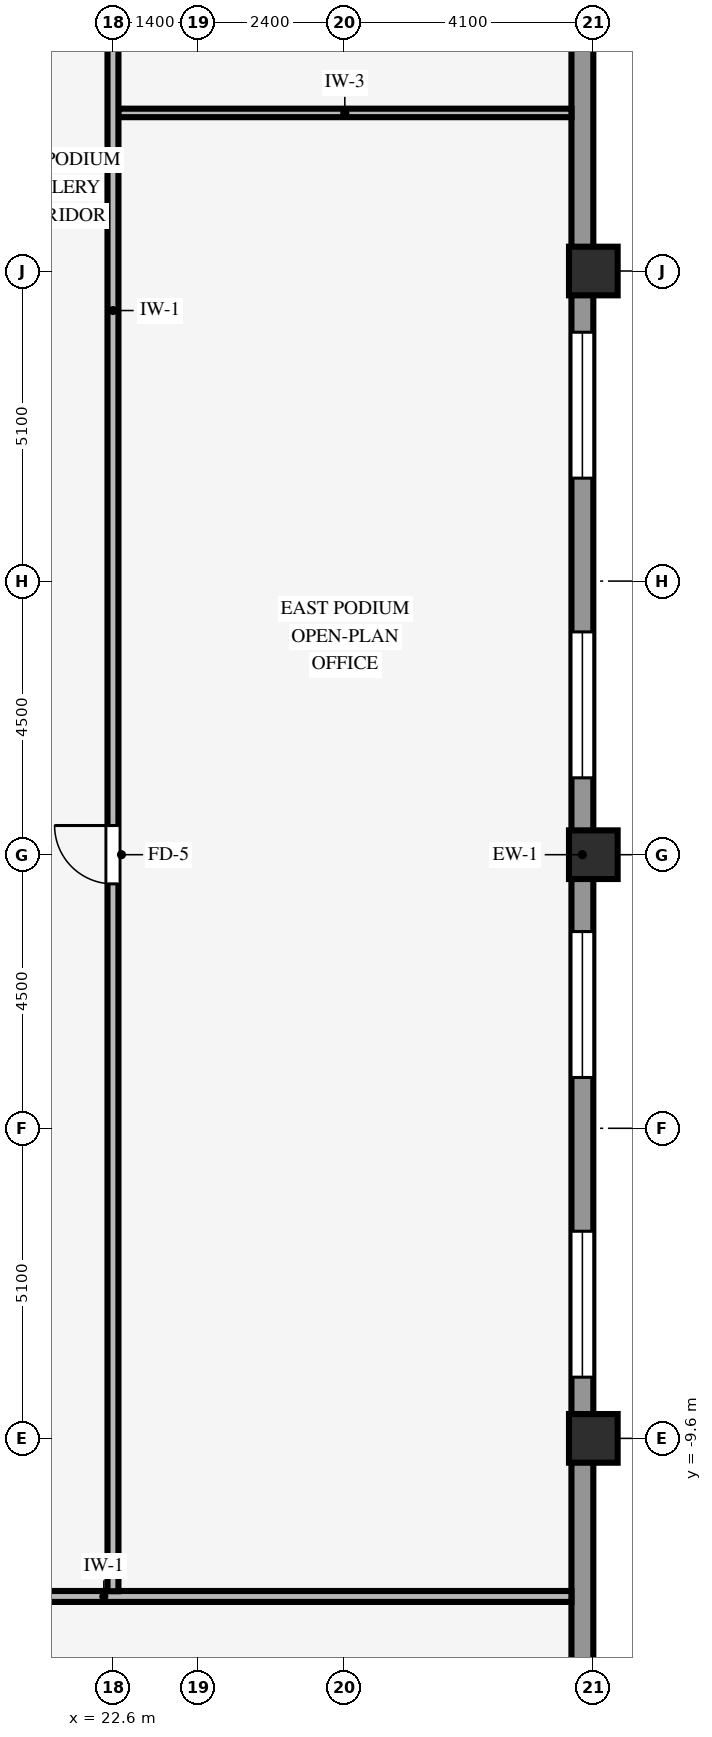
"""IFC4 building model, lengths in metres.
Left out: names, types, materials, properties, quantities, classifications, styles, units other than length and angle.
Written with IfcOpenShell. Run it as: python <this file> out.ifc"""

import sys

from ifc_helpers import new_model, si_unit, direction, frame, frame_2d, origin, origin_2d, place, context, subcontext, project, spatial, rectangle, hollow_rectangle, extrude, source, transform, mapped, element, fill, save


model = new_model("IFC4")
c1 = context("Model", 3, precision=1e-05, world=origin(), true_north=direction((0.0, 1.0)))
c2 = subcontext(c1, "Body", "Model", "MODEL_VIEW")
j1 = project(units=[si_unit("LENGTHUNIT", "METRE"), si_unit("PLANEANGLEUNIT", "RADIAN")], contexts=[c1])
p1 = place(None, origin())
s1 = spatial("IfcSite", under=j1, at=p1, CompositionType="ELEMENT")
p2 = place(p1, origin())
s2 = spatial("IfcBuilding", under=s1, at=p2, CompositionType="ELEMENT")
p3 = place(p2, frame((0.0, 0.0, 13.8)))
s3 = spatial("IfcBuildingStorey", under=s2, at=p3, CompositionType="ELEMENT", Elevation=13.8)
for number, where, z_axis, x_axis in (
    (1, (30.5, -9.6, 0.0), (0.0, 0.0, 1.0), (1.0, 0.0, 0.0)),
    (2, (30.5, 0.0, 0.0), (0.0, 0.0, 1.0), (1.0, 0.0, 0.0)),
    (3, (30.5, 9.6, 0.0), (0.0, 0.0, 1.0), (1.0, 0.0, 0.0)),
):
    element("IfcColumn", number, at=place(p3, frame(where, z_axis=z_axis, x_axis=x_axis)), inside=s3, PredefinedType="COLUMN", context=c2, shape_type="SweptSolid", body=[
        extrude(hollow_rectangle(XDim=0.8, YDim=0.8, WallThickness=0.055, InnerFilletRadius=0.055, OuterFilletRadius=0.11, at=origin_2d()), origin(), (0.0, 0.0, 1.0), 4.2),
    ])
p4 = place(p3, frame((30.32, -25.644, 0.0), z_axis=(0.0, 0.0, 1.0), x_axis=(0.0, 1.0, 0.0)))
e4 = element("IfcWall", 4, at=p4, inside=s3, PredefinedType="STANDARD", context=c2, shape_type="SweptSolid", body=[
    extrude(rectangle(XDim=51.288, YDim=0.36, at=frame_2d((25.644, 0.0))), origin(), (0.0, 0.0, 1.0), 3.535),
])
p5 = place(p4, frame((2.264, 0.0, 0.85)))
e5 = element("IfcOpeningElement", 5, at=p5, cuts=e4, PredefinedType="OPENING", context=c2, shape_type="SweptSolid", body=[
    extrude(rectangle(XDim=2.4, YDim=2.45, at=frame_2d((1.2, 1.225))), frame((0.0, 0.19, 0.0), z_axis=(0.0, -1.0, 0.0), x_axis=(1.0, 0.0, 0.0)), (0.0, 0.0, 1.0), 0.38),
])
p6 = place(p4, frame((17.051, 0.0, 0.85)))
e6 = element("IfcOpeningElement", 6, at=p6, cuts=e4, PredefinedType="OPENING", context=c2, shape_type="SweptSolid", body=[
    extrude(rectangle(XDim=2.4, YDim=2.45, at=frame_2d((1.2, 1.225))), frame((0.0, 0.19, 0.0), z_axis=(0.0, -1.0, 0.0), x_axis=(1.0, 0.0, 0.0)), (0.0, 0.0, 1.0), 0.38),
])
p7 = place(p4, frame((21.979, 0.0, 0.85)))
e7 = element("IfcOpeningElement", 7, at=p7, cuts=e4, PredefinedType="OPENING", context=c2, shape_type="SweptSolid", body=[
    extrude(rectangle(XDim=2.4, YDim=2.45, at=frame_2d((1.2, 1.225))), frame((0.0, 0.19, 0.0), z_axis=(0.0, -1.0, 0.0), x_axis=(1.0, 0.0, 0.0)), (0.0, 0.0, 1.0), 0.38),
])
p8 = place(p4, frame((26.908, 0.0, 0.85)))
e8 = element("IfcOpeningElement", 8, at=p8, cuts=e4, PredefinedType="OPENING", context=c2, shape_type="SweptSolid", body=[
    extrude(rectangle(XDim=2.4, YDim=2.45, at=frame_2d((1.2, 1.225))), frame((0.0, 0.19, 0.0), z_axis=(0.0, -1.0, 0.0), x_axis=(1.0, 0.0, 0.0)), (0.0, 0.0, 1.0), 0.38),
])
p9 = place(p4, frame((31.837, 0.0, 0.85)))
e9 = element("IfcOpeningElement", 9, at=p9, cuts=e4, PredefinedType="OPENING", context=c2, shape_type="SweptSolid", body=[
    extrude(rectangle(XDim=2.4, YDim=2.45, at=frame_2d((1.2, 1.225))), frame((0.0, 0.19, 0.0), z_axis=(0.0, -1.0, 0.0), x_axis=(1.0, 0.0, 0.0)), (0.0, 0.0, 1.0), 0.38),
])
p10 = place(p4, frame((46.624, 0.0, 0.85)))
e10 = element("IfcOpeningElement", 10, at=p10, cuts=e4, PredefinedType="OPENING", context=c2, shape_type="SweptSolid", body=[
    extrude(rectangle(XDim=2.4, YDim=2.45, at=frame_2d((1.2, 1.225))), frame((0.0, 0.19, 0.0), z_axis=(0.0, -1.0, 0.0), x_axis=(1.0, 0.0, 0.0)), (0.0, 0.0, 1.0), 0.38),
])
p11 = place(p3, frame((7.86, -12.2, 0.0), z_axis=(0.0, 0.0, 1.0), x_axis=(1.0, 0.0, 0.0)))
e11 = element("IfcWall", 11, at=p11, inside=s3, PredefinedType="PARTITIONING", context=c2, shape_type="SweptSolid", body=[
    extrude(rectangle(XDim=22.28, YDim=0.18, at=frame_2d((11.14, 0.0))), origin(), (0.0, 0.0, 1.0), 4.19),
])
p12 = place(p11, frame((5.49, 0.0, 0.0)))
e12 = element("IfcOpeningElement", 12, at=p12, cuts=e11, PredefinedType="OPENING", context=c2, shape_type="SweptSolid", body=[
    extrude(rectangle(XDim=0.96, YDim=2.1, at=frame_2d((0.48, 1.05))), frame((0.0, 0.1, 0.0), z_axis=(0.0, -1.0, 0.0), x_axis=(1.0, 0.0, 0.0)), (0.0, 0.0, 1.0), 0.2),
])
p13 = place(p3, frame((22.686, 12.2, 0.0), z_axis=(0.0, 0.0, 1.0), x_axis=(1.0, 0.0, 0.0)))
e13 = element("IfcWall", 13, at=p13, inside=s3, PredefinedType="PARTITIONING", context=c2, shape_type="SweptSolid", body=[
    extrude(rectangle(XDim=7.454, YDim=0.14, at=frame_2d((3.727, 0.0))), origin(), (0.0, 0.0, 1.0), 4.19),
])
p14 = place(p3, frame((22.6, -12.114, 0.0), z_axis=(0.0, 0.0, 1.0), x_axis=(0.0, 1.0, 0.0)))
e14 = element("IfcWall", 14, at=p14, inside=s3, PredefinedType="PARTITIONING", context=c2, shape_type="SweptSolid", body=[
    extrude(rectangle(XDim=37.919, YDim=0.18, at=frame_2d((18.959, 0.0))), origin(), (0.0, 0.0, 1.0), 4.19),
])
p15 = place(p14, frame((11.634, 0.0, 0.0)))
e15 = element("IfcOpeningElement", 15, at=p15, cuts=e14, PredefinedType="OPENING", context=c2, shape_type="SweptSolid", body=[
    extrude(rectangle(XDim=0.96, YDim=2.1, at=frame_2d((0.48, 1.05))), frame((0.0, 0.1, 0.0), z_axis=(0.0, -1.0, 0.0), x_axis=(1.0, 0.0, 0.0)), (0.0, 0.0, 1.0), 0.2),
])
p16 = place(p14, frame((29.534, 0.0, 0.0)))
e16 = element("IfcOpeningElement", 16, at=p16, cuts=e14, PredefinedType="OPENING", context=c2, shape_type="SweptSolid", body=[
    extrude(rectangle(XDim=0.96, YDim=2.1, at=frame_2d((0.48, 1.05))), frame((0.0, 0.1, 0.0), z_axis=(0.0, -1.0, 0.0), x_axis=(1.0, 0.0, 0.0)), (0.0, 0.0, 1.0), 0.2),
])
m1 = source(origin(), c2, "Body", "SweptSolid", [
    extrude(rectangle(XDim=2.4, YDim=2.45, at=frame_2d((1.2, 1.225))), frame((0.0, 0.03, 0.0), z_axis=(0.0, -1.0, 0.0), x_axis=(1.0, 0.0, 0.0)), (0.0, 0.0, 1.0), 0.06),
])
p17 = place(p6, origin())
e17 = element("IfcWindow", 17, at=p17, inside=s3, PartitioningType="SINGLE_PANEL", PredefinedType="WINDOW", context=c2, shape_type="MappedRepresentation", body=[
    mapped(m1, transform((0.0, 0.0, 0.0), scale=1.0)),
])
fill(e6, e17)
p18 = place(p7, origin())
e18 = element("IfcWindow", 18, at=p18, inside=s3, PartitioningType="SINGLE_PANEL", PredefinedType="WINDOW", context=c2, shape_type="MappedRepresentation", body=[
    mapped(m1, transform((0.0, 0.0, 0.0), scale=1.0)),
])
fill(e7, e18)
p19 = place(p8, origin())
e19 = element("IfcWindow", 19, at=p19, inside=s3, PartitioningType="SINGLE_PANEL", PredefinedType="WINDOW", context=c2, shape_type="MappedRepresentation", body=[
    mapped(m1, transform((0.0, 0.0, 0.0), scale=1.0)),
])
fill(e8, e19)
p20 = place(p9, origin())
e20 = element("IfcWindow", 20, at=p20, inside=s3, PartitioningType="SINGLE_PANEL", PredefinedType="WINDOW", context=c2, shape_type="MappedRepresentation", body=[
    mapped(m1, transform((0.0, 0.0, 0.0), scale=1.0)),
])
fill(e9, e20)
m2 = source(origin(), c2, "Body", "SweptSolid", [
    extrude(rectangle(XDim=0.96, YDim=2.1, at=frame_2d((0.48, 1.05))), frame((0.0, 0.025, 0.0), z_axis=(0.0, -1.0, 0.0), x_axis=(1.0, 0.0, 0.0)), (0.0, 0.0, 1.0), 0.05),
])
p21 = place(p15, origin())
e21 = element("IfcDoor", 21, at=p21, inside=s3, OperationType="SINGLE_SWING_RIGHT", PredefinedType="DOOR", context=c2, shape_type="MappedRepresentation", body=[
    mapped(m2, transform((0.0, 0.0, 0.0), scale=1.0)),
])
fill(e15, e21)
save(model, sys.argv[1])
